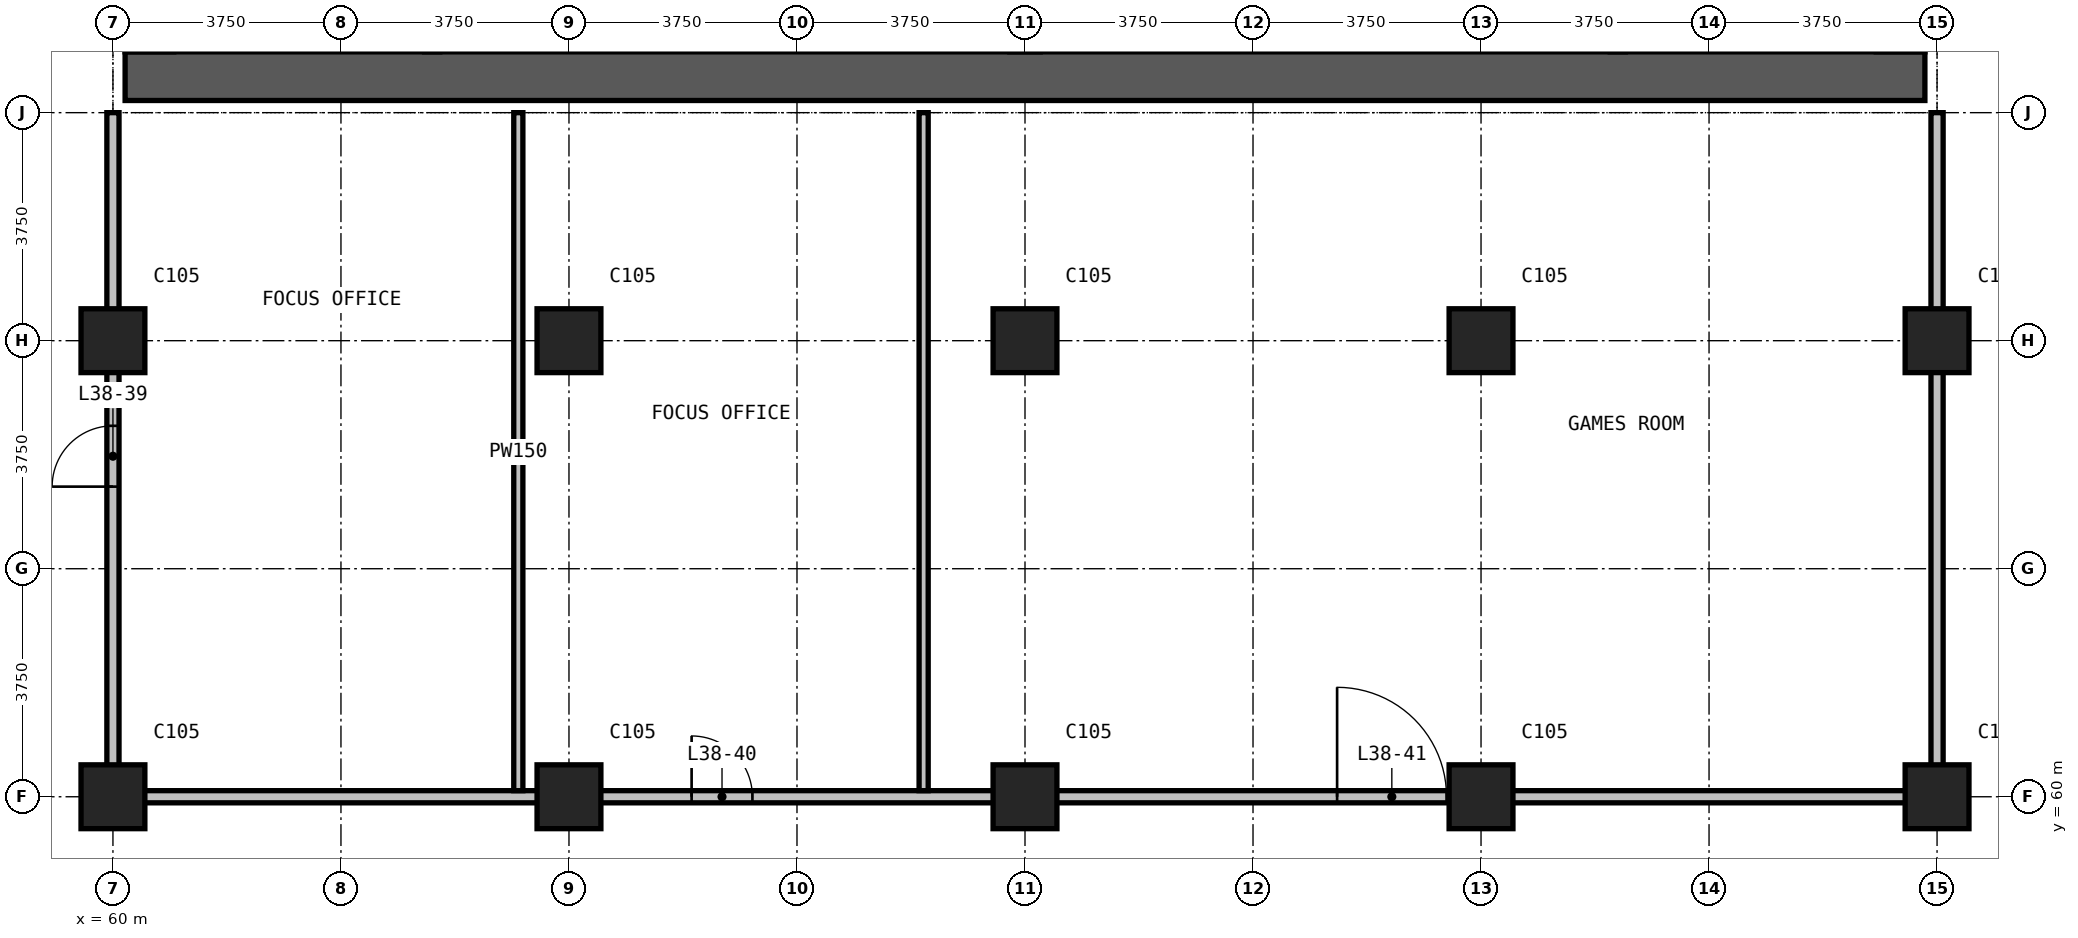
"""IFC4 building model, lengths in metres.
Left out: names, types, materials, properties, quantities, classifications, styles, units other than length and angle.
Written with IfcOpenShell. Run it as: python <this file> out.ifc"""

import sys

from ifc_helpers import new_model, si_unit, direction, frame, frame_2d, origin, origin_2d, place, context, subcontext, project, spatial, rectangle, extrude, element, fill, save


model = new_model("IFC4")
c1 = context("Model", 3, precision=1e-05, world=origin(), true_north=direction((0.0, 1.0)))
c2 = subcontext(c1, "Body", "Model", "MODEL_VIEW")
j1 = project(units=[si_unit("LENGTHUNIT", "METRE"), si_unit("PLANEANGLEUNIT", "RADIAN")], contexts=[c1])
p1 = place(None, origin())
s1 = spatial("IfcSite", under=j1, at=p1, CompositionType="ELEMENT")
p2 = place(p1, origin())
s2 = spatial("IfcBuilding", under=s1, at=p2, CompositionType="ELEMENT")
p3 = place(p2, frame((0.0, 0.0, 151.3)))
s3 = spatial("IfcBuildingStorey", under=s2, at=p3, CompositionType="ELEMENT", Elevation=151.3)
for number, where, z_axis, x_axis in (
    (1, (60.0, 60.0, 0.0), (0.0, 0.0, 1.0), (1.0, 0.0, 0.0)),
    (2, (60.0, 67.5, 0.0), (0.0, 0.0, 1.0), (1.0, 0.0, 0.0)),
    (3, (67.5, 60.0, 0.0), (0.0, 0.0, 1.0), (1.0, 0.0, 0.0)),
    (4, (67.5, 67.5, 0.0), (0.0, 0.0, 1.0), (1.0, 0.0, 0.0)),
    (5, (75.0, 60.0, 0.0), (0.0, 0.0, 1.0), (1.0, 0.0, 0.0)),
    (6, (75.0, 67.5, 0.0), (0.0, 0.0, 1.0), (1.0, 0.0, 0.0)),
    (7, (82.5, 60.0, 0.0), (0.0, 0.0, 1.0), (1.0, 0.0, 0.0)),
    (8, (82.5, 67.5, 0.0), (0.0, 0.0, 1.0), (1.0, 0.0, 0.0)),
    (9, (90.0, 60.0, 0.0), (0.0, 0.0, 1.0), (1.0, 0.0, 0.0)),
    (10, (90.0, 67.5, 0.0), (0.0, 0.0, 1.0), (1.0, 0.0, 0.0)),
):
    element("IfcColumn", number, at=place(p3, frame(where, z_axis=z_axis, x_axis=x_axis)), inside=s3, PredefinedType="COLUMN", context=c2, shape_type="SweptSolid", body=[
        extrude(rectangle(XDim=1.05, YDim=1.05, at=origin_2d()), origin(), (0.0, 0.0, 1.0), 3.6),
    ])
p4 = place(p3, frame((60.2, 71.85, 0.0), z_axis=(0.0, 0.0, 1.0), x_axis=(1.0, 0.0, 0.0)))
e11 = element("IfcWall", 11, at=p4, inside=s3, PredefinedType="SHEAR", context=c2, shape_type="SweptSolid", body=[
    extrude(rectangle(XDim=29.6, YDim=0.8, at=frame_2d((14.8, 0.0))), origin(), (0.0, 0.0, 1.0), 3.6),
])
p5 = place(p3, frame((60.1, 60.0, 0.0), z_axis=(0.0, 0.0, 1.0), x_axis=(1.0, 0.0, 0.0)))
e12 = element("IfcWall", 12, at=p5, inside=s3, PredefinedType="PARTITIONING", context=c2, shape_type="SweptSolid", body=[
    extrude(rectangle(XDim=29.8, YDim=0.2, at=frame_2d((14.9, 0.0))), origin(), (0.0, 0.0, 1.0), 3.3),
])
p6 = place(p5, frame((9.417, 0.0, 0.0)))
e13 = element("IfcOpeningElement", 13, at=p6, cuts=e12, PredefinedType="OPENING", context=c2, shape_type="SweptSolid", body=[
    extrude(rectangle(XDim=1.0, YDim=2.2, at=frame_2d((0.5, 1.1))), frame((0.0, 0.11, 0.0), z_axis=(0.0, -1.0, 0.0), x_axis=(1.0, 0.0, 0.0)), (0.0, 0.0, 1.0), 0.22),
])
p7 = place(p5, frame((20.033, 0.0, 0.0)))
e14 = element("IfcOpeningElement", 14, at=p7, cuts=e12, PredefinedType="OPENING", context=c2, shape_type="SweptSolid", body=[
    extrude(rectangle(XDim=1.8, YDim=2.2, at=frame_2d((0.9, 1.1))), frame((0.0, 0.11, 0.0), z_axis=(0.0, -1.0, 0.0), x_axis=(1.0, 0.0, 0.0)), (0.0, 0.0, 1.0), 0.22),
])
p8 = place(p3, frame((60.0, 59.9, 0.0), z_axis=(0.0, 0.0, 1.0), x_axis=(0.0, 1.0, 0.0)))
e15 = element("IfcWall", 15, at=p8, inside=s3, PredefinedType="PARTITIONING", context=c2, shape_type="SweptSolid", body=[
    extrude(rectangle(XDim=11.35, YDim=0.2, at=frame_2d((5.675, 0.0))), origin(), (0.0, 0.0, 1.0), 3.3),
])
p9 = place(p8, frame((5.2, 0.0, 0.0)))
e16 = element("IfcOpeningElement", 16, at=p9, cuts=e15, PredefinedType="OPENING", context=c2, shape_type="SweptSolid", body=[
    extrude(rectangle(XDim=1.0, YDim=2.2, at=frame_2d((0.5, 1.1))), frame((0.0, 0.11, 0.0), z_axis=(0.0, -1.0, 0.0), x_axis=(1.0, 0.0, 0.0)), (0.0, 0.0, 1.0), 0.22),
])
p10 = place(p3, frame((90.0, 59.9, 0.0), z_axis=(0.0, 0.0, 1.0), x_axis=(0.0, 1.0, 0.0)))
e17 = element("IfcWall", 17, at=p10, inside=s3, PredefinedType="PARTITIONING", context=c2, shape_type="SweptSolid", body=[
    extrude(rectangle(XDim=11.35, YDim=0.2, at=frame_2d((5.675, 0.0))), origin(), (0.0, 0.0, 1.0), 3.3),
])
for number, where, z_axis, x_axis in (
    (18, (66.667, 60.1, 0.0), (0.0, 0.0, 1.0), (0.0, 1.0, 0.0)),
    (19, (73.333, 60.1, 0.0), (0.0, 0.0, 1.0), (0.0, 1.0, 0.0)),
):
    element("IfcWall", number, at=place(p3, frame(where, z_axis=z_axis, x_axis=x_axis)), inside=s3, PredefinedType="PARTITIONING", context=c2, shape_type="SweptSolid", body=[
        extrude(rectangle(XDim=11.15, YDim=0.15, at=frame_2d((5.575, 0.0))), origin(), (0.0, 0.0, 1.0), 3.3),
    ])
p11 = place(p9, origin())
e20 = element("IfcDoor", 20, at=p11, inside=s3, OperationType="SINGLE_SWING_LEFT", PredefinedType="DOOR", context=c2, shape_type="SweptSolid", body=[
    extrude(rectangle(XDim=1.0, YDim=2.2, at=frame_2d((0.5, 1.1))), frame((0.0, 0.025, 0.0), z_axis=(0.0, -1.0, 0.0), x_axis=(1.0, 0.0, 0.0)), (0.0, 0.0, 1.0), 0.05),
])
fill(e16, e20)
p12 = place(p6, origin())
e21 = element("IfcDoor", 21, at=p12, inside=s3, OperationType="SINGLE_SWING_LEFT", PredefinedType="DOOR", context=c2, shape_type="SweptSolid", body=[
    extrude(rectangle(XDim=1.0, YDim=2.2, at=frame_2d((0.5, 1.1))), frame((0.0, 0.025, 0.0), z_axis=(0.0, -1.0, 0.0), x_axis=(1.0, 0.0, 0.0)), (0.0, 0.0, 1.0), 0.05),
])
fill(e13, e21)
p13 = place(p7, origin())
e22 = element("IfcDoor", 22, at=p13, inside=s3, OperationType="DOUBLE_DOOR_SINGLE_SWING", PredefinedType="DOOR", context=c2, shape_type="SweptSolid", body=[
    extrude(rectangle(XDim=1.8, YDim=2.2, at=frame_2d((0.9, 1.1))), frame((0.0, 0.025, 0.0), z_axis=(0.0, -1.0, 0.0), x_axis=(1.0, 0.0, 0.0)), (0.0, 0.0, 1.0), 0.05),
])
fill(e14, e22)
save(model, sys.argv[1])
